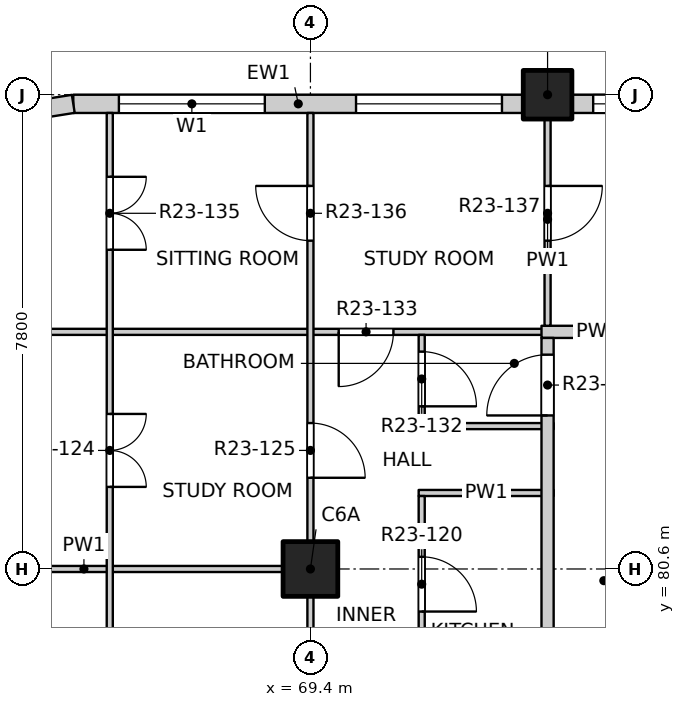
"""IFC4 building model, lengths in metres.
Left out: names, types, materials, properties, quantities, classifications, styles, units other than length and angle.
Written with IfcOpenShell. Run it as: python <this file> out.ifc"""

import sys

from ifc_helpers import new_model, si_unit, direction, frame, frame_2d, origin, origin_2d, place, context, subcontext, project, spatial, rectangle, extrude, element, fill, save


model = new_model("IFC4")
c1 = context("Model", 3, precision=1e-05, world=origin(), true_north=direction((0.0, 1.0)))
c2 = subcontext(c1, "Body", "Model", "MODEL_VIEW")
j1 = project(units=[si_unit("LENGTHUNIT", "METRE"), si_unit("PLANEANGLEUNIT", "RADIAN")], contexts=[c1])
p1 = place(None, origin())
s1 = spatial("IfcSite", under=j1, at=p1, CompositionType="ELEMENT")
p2 = place(p1, origin())
s2 = spatial("IfcBuilding", under=s1, at=p2, CompositionType="ELEMENT")
p3 = place(p2, frame((0.0, 0.0, 234.7)))
s3 = spatial("IfcBuildingStorey", under=s2, at=p3, CompositionType="ELEMENT", Elevation=234.7)
p4 = place(p3, frame((73.3, 88.4, -0.25), z_axis=(0.0, 0.0, 1.0), x_axis=(1.0, 0.0, 0.0)))
e1 = element("IfcColumn", 1, at=p4, inside=s3, PredefinedType="COLUMN", context=c2, shape_type="SweptSolid", body=[
    extrude(rectangle(XDim=0.8, YDim=0.8, at=origin_2d()), origin(), (0.0, 0.0, 1.0), 3.4),
])
p5 = place(p3, frame((69.4, 80.6, -0.25), z_axis=(0.0, 0.0, 1.0), x_axis=(1.0, 0.0, 0.0)))
e2 = element("IfcColumn", 2, at=p5, inside=s3, PredefinedType="COLUMN", context=c2, shape_type="SweptSolid", body=[
    extrude(rectangle(XDim=0.9, YDim=0.9, at=origin_2d()), origin(), (0.0, 0.0, 1.0), 3.4),
])
p6 = place(p3, frame((65.5, 88.25, 0.0), z_axis=(0.0, 0.0, 1.0), x_axis=(1.0, 0.0, 0.0)))
e3 = element("IfcWall", 3, at=p6, inside=s3, PredefinedType="SOLIDWALL", context=c2, shape_type="SweptSolid", body=[
    extrude(rectangle(XDim=7.4, YDim=0.3, at=frame_2d((3.7, 0.0))), origin(), (0.0, 0.0, 1.0), 2.7),
])
p7 = place(p6, frame((0.75, 0.0, 0.9)))
e4 = element("IfcOpeningElement", 4, at=p7, cuts=e3, PredefinedType="OPENING", context=c2, shape_type="SweptSolid", body=[
    extrude(rectangle(XDim=2.4, YDim=1.8, at=frame_2d((1.2, 0.9))), frame((0.0, 0.16, 0.0), z_axis=(0.0, -1.0, 0.0), x_axis=(1.0, 0.0, 0.0)), (0.0, 0.0, 1.0), 0.32),
])
p8 = place(p6, frame((4.65, 0.0, 0.9)))
e5 = element("IfcOpeningElement", 5, at=p8, cuts=e3, PredefinedType="OPENING", context=c2, shape_type="SweptSolid", body=[
    extrude(rectangle(XDim=2.4, YDim=1.8, at=frame_2d((1.2, 0.9))), frame((0.0, 0.16, 0.0), z_axis=(0.0, -1.0, 0.0), x_axis=(1.0, 0.0, 0.0)), (0.0, 0.0, 1.0), 0.32),
])
p9 = place(p3, frame((73.7, 88.25, 0.0), z_axis=(0.0, 0.0, 1.0), x_axis=(1.0, 0.0, 0.0)))
e6 = element("IfcWall", 6, at=p9, inside=s3, PredefinedType="SOLIDWALL", context=c2, shape_type="SweptSolid", body=[
    extrude(rectangle(XDim=22.6, YDim=0.3, at=frame_2d((11.3, 0.0))), origin(), (0.0, 0.0, 1.0), 2.7),
])
p10 = place(p9, frame((0.35, 0.0, 0.9)))
e7 = element("IfcOpeningElement", 7, at=p10, cuts=e6, PredefinedType="OPENING", context=c2, shape_type="SweptSolid", body=[
    extrude(rectangle(XDim=2.4, YDim=1.8, at=frame_2d((1.2, 0.9))), frame((0.0, 0.16, 0.0), z_axis=(0.0, -1.0, 0.0), x_axis=(1.0, 0.0, 0.0)), (0.0, 0.0, 1.0), 0.32),
])
p11 = place(p9, frame((4.25, 0.0, 0.9)))
e8 = element("IfcOpeningElement", 8, at=p11, cuts=e6, PredefinedType="OPENING", context=c2, shape_type="SweptSolid", body=[
    extrude(rectangle(XDim=2.4, YDim=1.8, at=frame_2d((1.2, 0.9))), frame((0.0, 0.16, 0.0), z_axis=(0.0, -1.0, 0.0), x_axis=(1.0, 0.0, 0.0)), (0.0, 0.0, 1.0), 0.32),
])
p12 = place(p9, frame((8.15, 0.0, 0.9)))
e9 = element("IfcOpeningElement", 9, at=p12, cuts=e6, PredefinedType="OPENING", context=c2, shape_type="SweptSolid", body=[
    extrude(rectangle(XDim=2.4, YDim=1.8, at=frame_2d((1.2, 0.9))), frame((0.0, 0.16, 0.0), z_axis=(0.0, -1.0, 0.0), x_axis=(1.0, 0.0, 0.0)), (0.0, 0.0, 1.0), 0.32),
])
p13 = place(p9, frame((12.05, 0.0, 0.9)))
e10 = element("IfcOpeningElement", 10, at=p13, cuts=e6, PredefinedType="OPENING", context=c2, shape_type="SweptSolid", body=[
    extrude(rectangle(XDim=2.4, YDim=1.8, at=frame_2d((1.2, 0.9))), frame((0.0, 0.16, 0.0), z_axis=(0.0, -1.0, 0.0), x_axis=(1.0, 0.0, 0.0)), (0.0, 0.0, 1.0), 0.32),
])
p14 = place(p9, frame((15.95, 0.0, 0.9)))
e11 = element("IfcOpeningElement", 11, at=p14, cuts=e6, PredefinedType="OPENING", context=c2, shape_type="SweptSolid", body=[
    extrude(rectangle(XDim=2.4, YDim=1.8, at=frame_2d((1.2, 0.9))), frame((0.0, 0.16, 0.0), z_axis=(0.0, -1.0, 0.0), x_axis=(1.0, 0.0, 0.0)), (0.0, 0.0, 1.0), 0.32),
])
p15 = place(p9, frame((19.85, 0.0, 0.9)))
e12 = element("IfcOpeningElement", 12, at=p15, cuts=e6, PredefinedType="OPENING", context=c2, shape_type="SweptSolid", body=[
    extrude(rectangle(XDim=2.4, YDim=1.8, at=frame_2d((1.2, 0.9))), frame((0.0, 0.16, 0.0), z_axis=(0.0, -1.0, 0.0), x_axis=(1.0, 0.0, 0.0)), (0.0, 0.0, 1.0), 0.32),
])
p16 = place(p3, frame((65.5, 88.25, 0.0), z_axis=(0.0, 0.0, 1.0), x_axis=(-0.987678452879, -0.156496880861, 0.0)))
e13 = element("IfcWall", 13, at=p16, inside=s3, PredefinedType="SOLIDWALL", context=c2, shape_type="SweptSolid", body=[
    extrude(rectangle(XDim=1.173, YDim=0.3, at=frame_2d((0.586, 0.0))), origin(), (0.0, 0.0, 1.0), 2.7),
])
p17 = place(p3, frame((61.9, 80.6, 0.0), z_axis=(0.0, 0.0, 1.0), x_axis=(1.0, 0.0, 0.0)))
e14 = element("IfcWall", 14, at=p17, inside=s3, PredefinedType="PARTITIONING", context=c2, shape_type="SweptSolid", body=[
    extrude(rectangle(XDim=7.55, YDim=0.1, at=frame_2d((3.775, 0.0))), origin(), (0.0, 0.0, 1.0), 3.15),
])
for number, where, z_axis, x_axis in (
    (15, (71.18, 81.85, 0.0), (0.0, 0.0, 1.0), (1.0, 0.0, 0.0)),
    (16, (71.18, 82.95, 0.0), (0.0, 0.0, 1.0), (1.0, 0.0, 0.0)),
):
    element("IfcWall", number, at=place(p3, frame(where, z_axis=z_axis, x_axis=x_axis)), inside=s3, PredefinedType="PARTITIONING", context=c2, shape_type="SweptSolid", body=[
        extrude(rectangle(XDim=2.22, YDim=0.1, at=frame_2d((1.11, 0.0))), origin(), (0.0, 0.0, 1.0), 3.15),
    ])
p18 = place(p3, frame((61.9, 84.5, 0.0), z_axis=(0.0, 0.0, 1.0), x_axis=(1.0, 0.0, 0.0)))
e17 = element("IfcWall", 17, at=p18, inside=s3, PredefinedType="PARTITIONING", context=c2, shape_type="SweptSolid", body=[
    extrude(rectangle(XDim=11.5, YDim=0.1, at=frame_2d((5.75, 0.0))), origin(), (0.0, 0.0, 1.0), 3.15),
])
p19 = place(p18, frame((7.965, 0.0, 0.0)))
e18 = element("IfcOpeningElement", 18, at=p19, cuts=e17, PredefinedType="OPENING", context=c2, shape_type="SweptSolid", body=[
    extrude(rectangle(XDim=0.9, YDim=2.1, at=frame_2d((0.45, 1.05))), frame((0.0, 0.06, 0.0), z_axis=(0.0, -1.0, 0.0), x_axis=(1.0, 0.0, 0.0)), (0.0, 0.0, 1.0), 0.12),
])
p20 = place(p3, frame((73.2, 84.5, 0.0), z_axis=(0.0, 0.0, 1.0), x_axis=(1.0, 0.0, 0.0)))
e19 = element("IfcWall", 19, at=p20, inside=s3, PredefinedType="PARTITIONING", context=c2, shape_type="SweptSolid", body=[
    extrude(rectangle(XDim=1.85, YDim=0.2, at=frame_2d((0.925, 0.0))), origin(), (0.0, 0.0, 1.0), 3.15),
])
p21 = place(p3, frame((66.1, 76.8, 0.0), z_axis=(0.0, 0.0, 1.0), x_axis=(0.0, 1.0, 0.0)))
e20 = element("IfcWall", 20, at=p21, inside=s3, PredefinedType="PARTITIONING", context=c2, shape_type="SweptSolid", body=[
    extrude(rectangle(XDim=11.3, YDim=0.1, at=frame_2d((5.65, 0.0))), origin(), (0.0, 0.0, 1.0), 3.15),
])
p22 = place(p21, frame((1.25, 0.0, 0.0)))
e21 = element("IfcOpeningElement", 21, at=p22, cuts=e20, PredefinedType="OPENING", context=c2, shape_type="SweptSolid", body=[
    extrude(rectangle(XDim=1.2, YDim=2.1, at=frame_2d((0.6, 1.05))), frame((0.0, 0.06, 0.0), z_axis=(0.0, -1.0, 0.0), x_axis=(1.0, 0.0, 0.0)), (0.0, 0.0, 1.0), 0.12),
])
p23 = place(p21, frame((5.15, 0.0, 0.0)))
e22 = element("IfcOpeningElement", 22, at=p23, cuts=e20, PredefinedType="OPENING", context=c2, shape_type="SweptSolid", body=[
    extrude(rectangle(XDim=1.2, YDim=2.1, at=frame_2d((0.6, 1.05))), frame((0.0, 0.06, 0.0), z_axis=(0.0, -1.0, 0.0), x_axis=(1.0, 0.0, 0.0)), (0.0, 0.0, 1.0), 0.12),
])
p24 = place(p21, frame((9.05, 0.0, 0.0)))
e23 = element("IfcOpeningElement", 23, at=p24, cuts=e20, PredefinedType="OPENING", context=c2, shape_type="SweptSolid", body=[
    extrude(rectangle(XDim=1.2, YDim=2.1, at=frame_2d((0.6, 1.05))), frame((0.0, 0.06, 0.0), z_axis=(0.0, -1.0, 0.0), x_axis=(1.0, 0.0, 0.0)), (0.0, 0.0, 1.0), 0.12),
])
p25 = place(p3, frame((69.4, 41.9, 0.0), z_axis=(0.0, 0.0, 1.0), x_axis=(0.0, 1.0, 0.0)))
e24 = element("IfcWall", 24, at=p25, inside=s3, PredefinedType="PARTITIONING", context=c2, shape_type="SweptSolid", body=[
    extrude(rectangle(XDim=46.2, YDim=0.1, at=frame_2d((23.1, 0.0))), origin(), (0.0, 0.0, 1.0), 3.15),
])
p26 = place(p25, frame((1.2, 0.0, 0.0)))
e25 = element("IfcOpeningElement", 25, at=p26, cuts=e24, PredefinedType="OPENING", context=c2, shape_type="SweptSolid", body=[
    extrude(rectangle(XDim=0.9, YDim=2.1, at=frame_2d((0.45, 1.05))), frame((0.0, 0.06, 0.0), z_axis=(0.0, -1.0, 0.0), x_axis=(1.0, 0.0, 0.0)), (0.0, 0.0, 1.0), 0.12),
])
p27 = place(p25, frame((6.025, 0.0, 0.0)))
e26 = element("IfcOpeningElement", 26, at=p27, cuts=e24, PredefinedType="OPENING", context=c2, shape_type="SweptSolid", body=[
    extrude(rectangle(XDim=0.9, YDim=2.1, at=frame_2d((0.45, 1.05))), frame((0.0, 0.06, 0.0), z_axis=(0.0, -1.0, 0.0), x_axis=(1.0, 0.0, 0.0)), (0.0, 0.0, 1.0), 0.12),
])
p28 = place(p25, frame((9.975, 0.0, 0.0)))
e27 = element("IfcOpeningElement", 27, at=p28, cuts=e24, PredefinedType="OPENING", context=c2, shape_type="SweptSolid", body=[
    extrude(rectangle(XDim=0.9, YDim=2.1, at=frame_2d((0.45, 1.05))), frame((0.0, 0.06, 0.0), z_axis=(0.0, -1.0, 0.0), x_axis=(1.0, 0.0, 0.0)), (0.0, 0.0, 1.0), 0.12),
])
p29 = place(p25, frame((12.9, 0.0, 0.0)))
e28 = element("IfcOpeningElement", 28, at=p29, cuts=e24, PredefinedType="OPENING", context=c2, shape_type="SweptSolid", body=[
    extrude(rectangle(XDim=0.9, YDim=2.1, at=frame_2d((0.45, 1.05))), frame((0.0, 0.06, 0.0), z_axis=(0.0, -1.0, 0.0), x_axis=(1.0, 0.0, 0.0)), (0.0, 0.0, 1.0), 0.12),
])
p30 = place(p25, frame((17.775, 0.0, 0.0)))
e29 = element("IfcOpeningElement", 29, at=p30, cuts=e24, PredefinedType="OPENING", context=c2, shape_type="SweptSolid", body=[
    extrude(rectangle(XDim=0.9, YDim=2.1, at=frame_2d((0.45, 1.05))), frame((0.0, 0.06, 0.0), z_axis=(0.0, -1.0, 0.0), x_axis=(1.0, 0.0, 0.0)), (0.0, 0.0, 1.0), 0.12),
])
p31 = place(p25, frame((21.625, 0.0, 0.0)))
e30 = element("IfcOpeningElement", 30, at=p31, cuts=e24, PredefinedType="OPENING", context=c2, shape_type="SweptSolid", body=[
    extrude(rectangle(XDim=0.9, YDim=2.1, at=frame_2d((0.45, 1.05))), frame((0.0, 0.06, 0.0), z_axis=(0.0, -1.0, 0.0), x_axis=(1.0, 0.0, 0.0)), (0.0, 0.0, 1.0), 0.12),
])
p32 = place(p25, frame((25.575, 0.0, 0.0)))
e31 = element("IfcOpeningElement", 31, at=p32, cuts=e24, PredefinedType="OPENING", context=c2, shape_type="SweptSolid", body=[
    extrude(rectangle(XDim=0.9, YDim=2.1, at=frame_2d((0.45, 1.05))), frame((0.0, 0.06, 0.0), z_axis=(0.0, -1.0, 0.0), x_axis=(1.0, 0.0, 0.0)), (0.0, 0.0, 1.0), 0.12),
])
p33 = place(p25, frame((28.5, 0.0, 0.0)))
e32 = element("IfcOpeningElement", 32, at=p33, cuts=e24, PredefinedType="OPENING", context=c2, shape_type="SweptSolid", body=[
    extrude(rectangle(XDim=0.9, YDim=2.1, at=frame_2d((0.45, 1.05))), frame((0.0, 0.06, 0.0), z_axis=(0.0, -1.0, 0.0), x_axis=(1.0, 0.0, 0.0)), (0.0, 0.0, 1.0), 0.12),
])
p34 = place(p25, frame((32.4, 0.0, 0.0)))
e33 = element("IfcOpeningElement", 33, at=p34, cuts=e24, PredefinedType="OPENING", context=c2, shape_type="SweptSolid", body=[
    extrude(rectangle(XDim=0.9, YDim=2.1, at=frame_2d((0.45, 1.05))), frame((0.0, 0.06, 0.0), z_axis=(0.0, -1.0, 0.0), x_axis=(1.0, 0.0, 0.0)), (0.0, 0.0, 1.0), 0.12),
])
p35 = place(p25, frame((36.3, 0.0, 0.0)))
e34 = element("IfcOpeningElement", 34, at=p35, cuts=e24, PredefinedType="OPENING", context=c2, shape_type="SweptSolid", body=[
    extrude(rectangle(XDim=0.9, YDim=2.1, at=frame_2d((0.45, 1.05))), frame((0.0, 0.06, 0.0), z_axis=(0.0, -1.0, 0.0), x_axis=(1.0, 0.0, 0.0)), (0.0, 0.0, 1.0), 0.12),
])
p36 = place(p25, frame((40.2, 0.0, 0.0)))
e35 = element("IfcOpeningElement", 35, at=p36, cuts=e24, PredefinedType="OPENING", context=c2, shape_type="SweptSolid", body=[
    extrude(rectangle(XDim=0.9, YDim=2.1, at=frame_2d((0.45, 1.05))), frame((0.0, 0.06, 0.0), z_axis=(0.0, -1.0, 0.0), x_axis=(1.0, 0.0, 0.0)), (0.0, 0.0, 1.0), 0.12),
])
p37 = place(p25, frame((44.1, 0.0, 0.0)))
e36 = element("IfcOpeningElement", 36, at=p37, cuts=e24, PredefinedType="OPENING", context=c2, shape_type="SweptSolid", body=[
    extrude(rectangle(XDim=0.9, YDim=2.1, at=frame_2d((0.45, 1.05))), frame((0.0, 0.06, 0.0), z_axis=(0.0, -1.0, 0.0), x_axis=(1.0, 0.0, 0.0)), (0.0, 0.0, 1.0), 0.12),
])
p38 = place(p3, frame((71.23, 63.95, 0.0), z_axis=(0.0, 0.0, 1.0), x_axis=(0.0, 1.0, 0.0)))
e37 = element("IfcWall", 37, at=p38, inside=s3, PredefinedType="PARTITIONING", context=c2, shape_type="SweptSolid", body=[
    extrude(rectangle(XDim=17.85, YDim=0.1, at=frame_2d((8.925, 0.0))), origin(), (0.0, 0.0, 1.0), 3.15),
])
p39 = place(p38, frame((0.7, 0.0, 0.0)))
e38 = element("IfcOpeningElement", 38, at=p39, cuts=e37, PredefinedType="OPENING", context=c2, shape_type="SweptSolid", body=[
    extrude(rectangle(XDim=0.9, YDim=2.1, at=frame_2d((0.45, 1.05))), frame((0.0, 0.06, 0.0), z_axis=(0.0, -1.0, 0.0), x_axis=(1.0, 0.0, 0.0)), (0.0, 0.0, 1.0), 0.12),
])
p40 = place(p38, frame((3.1, 0.0, 0.0)))
e39 = element("IfcOpeningElement", 39, at=p40, cuts=e37, PredefinedType="OPENING", context=c2, shape_type="SweptSolid", body=[
    extrude(rectangle(XDim=0.8, YDim=2.1, at=frame_2d((0.4, 1.05))), frame((0.0, 0.06, 0.0), z_axis=(0.0, -1.0, 0.0), x_axis=(1.0, 0.0, 0.0)), (0.0, 0.0, 1.0), 0.12),
])
p41 = place(p38, frame((5.115, 0.0, 0.0)))
e40 = element("IfcOpeningElement", 40, at=p41, cuts=e37, PredefinedType="OPENING", context=c2, shape_type="SweptSolid", body=[
    extrude(rectangle(XDim=0.9, YDim=2.1, at=frame_2d((0.45, 1.05))), frame((0.0, 0.06, 0.0), z_axis=(0.0, -1.0, 0.0), x_axis=(1.0, 0.0, 0.0)), (0.0, 0.0, 1.0), 0.12),
])
p42 = place(p38, frame((7.455, 0.0, 0.0)))
e41 = element("IfcOpeningElement", 41, at=p42, cuts=e37, PredefinedType="OPENING", context=c2, shape_type="SweptSolid", body=[
    extrude(rectangle(XDim=0.8, YDim=2.1, at=frame_2d((0.4, 1.05))), frame((0.0, 0.06, 0.0), z_axis=(0.0, -1.0, 0.0), x_axis=(1.0, 0.0, 0.0)), (0.0, 0.0, 1.0), 0.12),
])
p43 = place(p38, frame((10.54, 0.0, 0.0)))
e42 = element("IfcOpeningElement", 42, at=p43, cuts=e37, PredefinedType="OPENING", context=c2, shape_type="SweptSolid", body=[
    extrude(rectangle(XDim=0.9, YDim=2.1, at=frame_2d((0.45, 1.05))), frame((0.0, 0.06, 0.0), z_axis=(0.0, -1.0, 0.0), x_axis=(1.0, 0.0, 0.0)), (0.0, 0.0, 1.0), 0.12),
])
p44 = place(p38, frame((13.425, 0.0, 0.0)))
e43 = element("IfcOpeningElement", 43, at=p44, cuts=e37, PredefinedType="OPENING", context=c2, shape_type="SweptSolid", body=[
    extrude(rectangle(XDim=0.8, YDim=2.1, at=frame_2d((0.4, 1.05))), frame((0.0, 0.06, 0.0), z_axis=(0.0, -1.0, 0.0), x_axis=(1.0, 0.0, 0.0)), (0.0, 0.0, 1.0), 0.12),
])
p45 = place(p38, frame((15.95, 0.0, 0.0)))
e44 = element("IfcOpeningElement", 44, at=p45, cuts=e37, PredefinedType="OPENING", context=c2, shape_type="SweptSolid", body=[
    extrude(rectangle(XDim=0.9, YDim=2.1, at=frame_2d((0.45, 1.05))), frame((0.0, 0.06, 0.0), z_axis=(0.0, -1.0, 0.0), x_axis=(1.0, 0.0, 0.0)), (0.0, 0.0, 1.0), 0.12),
])
p46 = place(p3, frame((71.23, 83.0, 0.0), z_axis=(0.0, 0.0, 1.0), x_axis=(0.0, 1.0, 0.0)))
e45 = element("IfcWall", 45, at=p46, inside=s3, PredefinedType="PARTITIONING", context=c2, shape_type="SweptSolid", body=[
    extrude(rectangle(XDim=1.45, YDim=0.1, at=frame_2d((0.725, 0.0))), origin(), (0.0, 0.0, 1.0), 3.15),
])
p47 = place(p46, frame((0.275, 0.0, 0.0)))
e46 = element("IfcOpeningElement", 46, at=p47, cuts=e45, PredefinedType="OPENING", context=c2, shape_type="SweptSolid", body=[
    extrude(rectangle(XDim=0.9, YDim=2.1, at=frame_2d((0.45, 1.05))), frame((0.0, 0.06, 0.0), z_axis=(0.0, -1.0, 0.0), x_axis=(1.0, 0.0, 0.0)), (0.0, 0.0, 1.0), 0.12),
])
p48 = place(p3, frame((73.3, 49.5, 0.0), z_axis=(0.0, 0.0, 1.0), x_axis=(0.0, 1.0, 0.0)))
e47 = element("IfcWall", 47, at=p48, inside=s3, PredefinedType="PARTITIONING", context=c2, shape_type="SweptSolid", body=[
    extrude(rectangle(XDim=34.9, YDim=0.2, at=frame_2d((17.45, 0.0))), origin(), (0.0, 0.0, 1.0), 3.15),
])
p49 = place(p48, frame((3.075, 0.0, 0.0)))
e48 = element("IfcOpeningElement", 48, at=p49, cuts=e47, PredefinedType="OPENING", context=c2, shape_type="SweptSolid", body=[
    extrude(rectangle(XDim=1.0, YDim=2.1, at=frame_2d((0.5, 1.05))), frame((0.0, 0.11, 0.0), z_axis=(0.0, -1.0, 0.0), x_axis=(1.0, 0.0, 0.0)), (0.0, 0.0, 1.0), 0.22),
])
p50 = place(p48, frame((14.575, 0.0, 0.0)))
e49 = element("IfcOpeningElement", 49, at=p50, cuts=e47, PredefinedType="OPENING", context=c2, shape_type="SweptSolid", body=[
    extrude(rectangle(XDim=1.0, YDim=2.1, at=frame_2d((0.5, 1.05))), frame((0.0, 0.11, 0.0), z_axis=(0.0, -1.0, 0.0), x_axis=(1.0, 0.0, 0.0)), (0.0, 0.0, 1.0), 0.22),
])
p51 = place(p48, frame((33.625, 0.0, 0.0)))
e50 = element("IfcOpeningElement", 50, at=p51, cuts=e47, PredefinedType="OPENING", context=c2, shape_type="SweptSolid", body=[
    extrude(rectangle(XDim=1.0, YDim=2.1, at=frame_2d((0.5, 1.05))), frame((0.0, 0.11, 0.0), z_axis=(0.0, -1.0, 0.0), x_axis=(1.0, 0.0, 0.0)), (0.0, 0.0, 1.0), 0.22),
])
p52 = place(p3, frame((73.3, 84.6, 0.0), z_axis=(0.0, 0.0, 1.0), x_axis=(0.0, 1.0, 0.0)))
e51 = element("IfcWall", 51, at=p52, inside=s3, PredefinedType="PARTITIONING", context=c2, shape_type="SweptSolid", body=[
    extrude(rectangle(XDim=3.5, YDim=0.1, at=frame_2d((1.75, 0.0))), origin(), (0.0, 0.0, 1.0), 3.15),
])
p53 = place(p52, frame((1.4, 0.0, 0.0)))
e52 = element("IfcOpeningElement", 52, at=p53, cuts=e51, PredefinedType="OPENING", context=c2, shape_type="SweptSolid", body=[
    extrude(rectangle(XDim=0.9, YDim=2.1, at=frame_2d((0.45, 1.05))), frame((0.0, 0.06, 0.0), z_axis=(0.0, -1.0, 0.0), x_axis=(1.0, 0.0, 0.0)), (0.0, 0.0, 1.0), 0.12),
])
p54 = place(p7, origin())
e53 = element("IfcWindow", 53, at=p54, inside=s3, PartitioningType="DOUBLE_PANEL_VERTICAL", PredefinedType="WINDOW", context=c2, shape_type="SweptSolid", body=[
    extrude(rectangle(XDim=2.4, YDim=1.8, at=frame_2d((1.2, 0.9))), frame((0.0, 0.03, 0.0), z_axis=(0.0, -1.0, 0.0), x_axis=(1.0, 0.0, 0.0)), (0.0, 0.0, 1.0), 0.06),
])
fill(e4, e53)
p55 = place(p8, origin())
e54 = element("IfcWindow", 54, at=p55, inside=s3, PartitioningType="DOUBLE_PANEL_VERTICAL", PredefinedType="WINDOW", context=c2, shape_type="SweptSolid", body=[
    extrude(rectangle(XDim=2.4, YDim=1.8, at=frame_2d((1.2, 0.9))), frame((0.0, 0.03, 0.0), z_axis=(0.0, -1.0, 0.0), x_axis=(1.0, 0.0, 0.0)), (0.0, 0.0, 1.0), 0.06),
])
fill(e5, e54)
p56 = place(p10, origin())
e55 = element("IfcWindow", 55, at=p56, inside=s3, PartitioningType="DOUBLE_PANEL_VERTICAL", PredefinedType="WINDOW", context=c2, shape_type="SweptSolid", body=[
    extrude(rectangle(XDim=2.4, YDim=1.8, at=frame_2d((1.2, 0.9))), frame((0.0, 0.03, 0.0), z_axis=(0.0, -1.0, 0.0), x_axis=(1.0, 0.0, 0.0)), (0.0, 0.0, 1.0), 0.06),
])
fill(e7, e55)
p57 = place(p45, origin())
e56 = element("IfcDoor", 56, at=p57, inside=s3, OperationType="SINGLE_SWING_RIGHT", PredefinedType="DOOR", context=c2, shape_type="SweptSolid", body=[
    extrude(rectangle(XDim=0.9, YDim=2.1, at=frame_2d((0.45, 1.05))), frame((0.0, 0.025, 0.0), z_axis=(0.0, -1.0, 0.0), x_axis=(1.0, 0.0, 0.0)), (0.0, 0.0, 1.0), 0.05),
])
fill(e44, e56)
p58 = place(p23, origin())
e57 = element("IfcDoor", 57, at=p58, inside=s3, OperationType="DOUBLE_DOOR_SINGLE_SWING", PredefinedType="DOOR", context=c2, shape_type="SweptSolid", body=[
    extrude(rectangle(XDim=1.2, YDim=2.1, at=frame_2d((0.6, 1.05))), frame((0.0, 0.025, 0.0), z_axis=(0.0, -1.0, 0.0), x_axis=(1.0, 0.0, 0.0)), (0.0, 0.0, 1.0), 0.05),
])
fill(e22, e57)
p59 = place(p36, origin())
e58 = element("IfcDoor", 58, at=p59, inside=s3, OperationType="SINGLE_SWING_RIGHT", PredefinedType="DOOR", context=c2, shape_type="SweptSolid", body=[
    extrude(rectangle(XDim=0.9, YDim=2.1, at=frame_2d((0.45, 1.05))), frame((0.0, 0.025, 0.0), z_axis=(0.0, -1.0, 0.0), x_axis=(1.0, 0.0, 0.0)), (0.0, 0.0, 1.0), 0.05),
])
fill(e35, e58)
p60 = place(p51, origin())
e59 = element("IfcDoor", 59, at=p60, inside=s3, OperationType="SINGLE_SWING_RIGHT", PredefinedType="DOOR", context=c2, shape_type="SweptSolid", body=[
    extrude(rectangle(XDim=1.0, YDim=2.1, at=frame_2d((0.5, 1.05))), frame((0.0, 0.025, 0.0), z_axis=(0.0, -1.0, 0.0), x_axis=(1.0, 0.0, 0.0)), (0.0, 0.0, 1.0), 0.05),
])
fill(e50, e59)
p61 = place(p47, origin())
e60 = element("IfcDoor", 60, at=p61, inside=s3, OperationType="SINGLE_SWING_RIGHT", PredefinedType="DOOR", context=c2, shape_type="SweptSolid", body=[
    extrude(rectangle(XDim=0.9, YDim=2.1, at=frame_2d((0.45, 1.05))), frame((0.0, 0.025, 0.0), z_axis=(0.0, -1.0, 0.0), x_axis=(1.0, 0.0, 0.0)), (0.0, 0.0, 1.0), 0.05),
])
fill(e46, e60)
p62 = place(p19, origin())
e61 = element("IfcDoor", 61, at=p62, inside=s3, OperationType="SINGLE_SWING_RIGHT", PredefinedType="DOOR", context=c2, shape_type="SweptSolid", body=[
    extrude(rectangle(XDim=0.9, YDim=2.1, at=frame_2d((0.45, 1.05))), frame((0.0, 0.025, 0.0), z_axis=(0.0, -1.0, 0.0), x_axis=(1.0, 0.0, 0.0)), (0.0, 0.0, 1.0), 0.05),
])
fill(e18, e61)
p63 = place(p24, origin())
e62 = element("IfcDoor", 62, at=p63, inside=s3, OperationType="DOUBLE_DOOR_SINGLE_SWING", PredefinedType="DOOR", context=c2, shape_type="SweptSolid", body=[
    extrude(rectangle(XDim=1.2, YDim=2.1, at=frame_2d((0.6, 1.05))), frame((0.0, 0.025, 0.0), z_axis=(0.0, -1.0, 0.0), x_axis=(1.0, 0.0, 0.0)), (0.0, 0.0, 1.0), 0.05),
])
fill(e23, e62)
p64 = place(p37, origin())
e63 = element("IfcDoor", 63, at=p64, inside=s3, OperationType="SINGLE_SWING_RIGHT", PredefinedType="DOOR", context=c2, shape_type="SweptSolid", body=[
    extrude(rectangle(XDim=0.9, YDim=2.1, at=frame_2d((0.45, 1.05))), frame((0.0, 0.025, 0.0), z_axis=(0.0, -1.0, 0.0), x_axis=(1.0, 0.0, 0.0)), (0.0, 0.0, 1.0), 0.05),
])
fill(e36, e63)
p65 = place(p53, origin())
e64 = element("IfcDoor", 64, at=p65, inside=s3, OperationType="SINGLE_SWING_LEFT", PredefinedType="DOOR", context=c2, shape_type="SweptSolid", body=[
    extrude(rectangle(XDim=0.9, YDim=2.1, at=frame_2d((0.45, 1.05))), frame((0.0, 0.025, 0.0), z_axis=(0.0, -1.0, 0.0), x_axis=(1.0, 0.0, 0.0)), (0.0, 0.0, 1.0), 0.05),
])
fill(e52, e64)
save(model, sys.argv[1])
